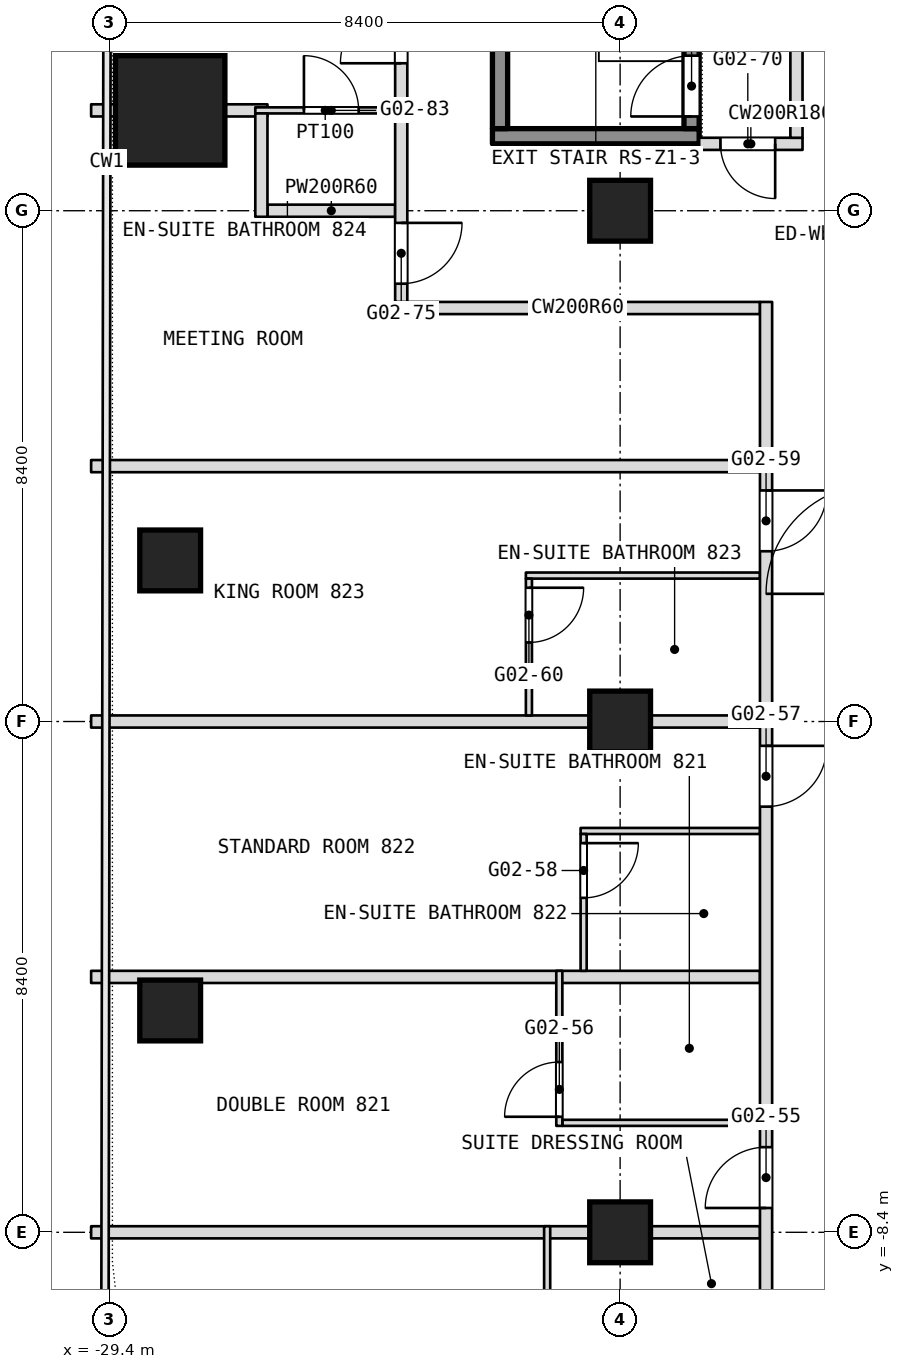
"""IFC4 building model, lengths in metres.
Left out: names, types, materials, properties, quantities, classifications, styles, units other than length and angle.
Written with IfcOpenShell. Run it as: python <this file> out.ifc"""

import sys

from ifc_helpers import new_model, si_unit, direction, frame, frame_2d, origin, origin_2d, place, context, subcontext, project, spatial, rectangle, extrude, element, fill, save


model = new_model("IFC4")
c1 = context("Model", 3, precision=1e-05, world=origin(), true_north=direction((0.0, 1.0)))
c2 = subcontext(c1, "Body", "Model", "MODEL_VIEW")
j1 = project(units=[si_unit("LENGTHUNIT", "METRE"), si_unit("PLANEANGLEUNIT", "RADIAN")], contexts=[c1])
p1 = place(None, origin())
s1 = spatial("IfcSite", under=j1, at=p1, CompositionType="ELEMENT")
p2 = place(p1, origin())
s2 = spatial("IfcBuilding", under=s1, at=p2, CompositionType="ELEMENT")
p3 = place(p2, frame((0.0, 0.0, 43.7)))
s3 = spatial("IfcBuildingStorey", under=s2, at=p3, CompositionType="ELEMENT", Elevation=43.7)
p4 = place(p3, frame((-28.4, 10.05, 0.0), z_axis=(0.0, 0.0, 1.0), x_axis=(1.0, 0.0, 0.0)))
e1 = element("IfcColumn", 1, at=p4, inside=s3, PredefinedType="COLUMN", context=c2, shape_type="SweptSolid", body=[
    extrude(rectangle(XDim=1.8, YDim=1.8, at=origin_2d()), origin(), (0.0, 0.0, 1.0), 3.6),
])
for number, where, z_axis, x_axis in (
    (2, (-21.0, -8.4, 0.0), (0.0, 0.0, 1.0), (1.0, 0.0, 0.0)),
    (3, (-21.0, 0.0, 0.0), (0.0, 0.0, 1.0), (1.0, 0.0, 0.0)),
    (4, (-21.0, 8.4, 0.0), (0.0, 0.0, 1.0), (1.0, 0.0, 0.0)),
    (5, (-28.4, -4.752, 0.0), (0.0, 0.0, 1.0), (1.0, 0.0, 0.0)),
    (6, (-28.4, 2.649, 0.0), (0.0, 0.0, 1.0), (1.0, 0.0, 0.0)),
):
    element("IfcColumn", number, at=place(p3, frame(where, z_axis=z_axis, x_axis=x_axis)), inside=s3, PredefinedType="COLUMN", context=c2, shape_type="SweptSolid", body=[
        extrude(rectangle(XDim=1.0, YDim=1.0, at=origin_2d()), origin(), (0.0, 0.0, 1.0), 3.6),
    ])
p5 = place(p3, frame((-29.7, -8.4, 0.0), z_axis=(0.0, 0.0, 1.0), x_axis=(1.0, 0.0, 0.0)))
e7 = element("IfcWall", 7, at=p5, inside=s3, PredefinedType="PARTITIONING", context=c2, shape_type="SweptSolid", body=[
    extrude(rectangle(XDim=11.0, YDim=0.2, at=frame_2d((5.5, 0.0))), origin(), (0.0, 0.0, 1.0), 2.84),
])
p6 = place(p3, frame((-21.95, -6.6, 0.0), z_axis=(0.0, 0.0, 1.0), x_axis=(1.0, 0.0, 0.0)))
e8 = element("IfcWall", 8, at=p6, inside=s3, PredefinedType="PARTITIONING", context=c2, shape_type="SweptSolid", body=[
    extrude(rectangle(XDim=3.25, YDim=0.1, at=frame_2d((1.625, 0.0))), origin(), (0.0, 0.0, 1.0), 3.34),
])
p7 = place(p3, frame((-29.7, -4.2, 0.0), z_axis=(0.0, 0.0, 1.0), x_axis=(1.0, 0.0, 0.0)))
e9 = element("IfcWall", 9, at=p7, inside=s3, PredefinedType="PARTITIONING", context=c2, shape_type="SweptSolid", body=[
    extrude(rectangle(XDim=11.0, YDim=0.2, at=frame_2d((5.5, 0.0))), origin(), (0.0, 0.0, 1.0), 3.34),
])
p8 = place(p3, frame((-21.65, -1.8, 0.0), z_axis=(0.0, 0.0, 1.0), x_axis=(1.0, 0.0, 0.0)))
e10 = element("IfcWall", 10, at=p8, inside=s3, PredefinedType="PARTITIONING", context=c2, shape_type="SweptSolid", body=[
    extrude(rectangle(XDim=2.95, YDim=0.1, at=frame_2d((1.475, 0.0))), origin(), (0.0, 0.0, 1.0), 3.34),
])
p9 = place(p3, frame((-29.7, 0.0, 0.0), z_axis=(0.0, 0.0, 1.0), x_axis=(1.0, 0.0, 0.0)))
e11 = element("IfcWall", 11, at=p9, inside=s3, PredefinedType="PARTITIONING", context=c2, shape_type="SweptSolid", body=[
    extrude(rectangle(XDim=11.0, YDim=0.2, at=frame_2d((5.5, 0.0))), origin(), (0.0, 0.0, 1.0), 2.84),
])
p10 = place(p3, frame((-22.55, 2.4, 0.0), z_axis=(0.0, 0.0, 1.0), x_axis=(1.0, 0.0, 0.0)))
e12 = element("IfcWall", 12, at=p10, inside=s3, PredefinedType="PARTITIONING", context=c2, shape_type="SweptSolid", body=[
    extrude(rectangle(XDim=3.85, YDim=0.1, at=frame_2d((1.925, 0.0))), origin(), (0.0, 0.0, 1.0), 3.34),
])
p11 = place(p3, frame((-29.7, 4.2, 0.0), z_axis=(0.0, 0.0, 1.0), x_axis=(1.0, 0.0, 0.0)))
e13 = element("IfcWall", 13, at=p11, inside=s3, PredefinedType="PARTITIONING", context=c2, shape_type="SweptSolid", body=[
    extrude(rectangle(XDim=11.0, YDim=0.2, at=frame_2d((5.5, 0.0))), origin(), (0.0, 0.0, 1.0), 3.34),
])
p12 = place(p3, frame((-24.7, 6.8, 0.0), z_axis=(0.0, 0.0, 1.0), x_axis=(1.0, 0.0, 0.0)))
e14 = element("IfcWall", 14, at=p12, inside=s3, PredefinedType="PARTITIONING", context=c2, shape_type="SweptSolid", body=[
    extrude(rectangle(XDim=6.0, YDim=0.2, at=frame_2d((3.0, 0.0))), origin(), (0.0, 0.0, 1.0), 3.34),
])
p13 = place(p3, frame((-26.8, 8.4, 0.0), z_axis=(0.0, 0.0, 1.0), x_axis=(1.0, 0.0, 0.0)))
e15 = element("IfcWall", 15, at=p13, inside=s3, PredefinedType="PARTITIONING", context=c2, shape_type="SweptSolid", body=[
    extrude(rectangle(XDim=2.1, YDim=0.2, at=frame_2d((1.05, 0.0))), origin(), (0.0, 0.0, 1.0), 2.84),
])
p14 = place(p3, frame((-19.7, 9.5, 0.0), z_axis=(0.0, 0.0, 1.0), x_axis=(1.0, 0.0, 0.0)))
e16 = element("IfcWall", 16, at=p14, inside=s3, PredefinedType="PARTITIONING", context=c2, shape_type="SweptSolid", body=[
    extrude(rectangle(XDim=1.7, YDim=0.2, at=frame_2d((0.85, 0.0))), origin(), (0.0, 0.0, 1.0), 3.34),
])
p15 = place(p14, frame((0.35, 0.0, 0.0)))
e17 = element("IfcOpeningElement", 17, at=p15, cuts=e16, PredefinedType="OPENING", context=c2, shape_type="SweptSolid", body=[
    extrude(rectangle(XDim=0.9, YDim=2.1, at=frame_2d((0.45, 1.05))), frame((0.0, 0.1, 0.0), z_axis=(0.0, -1.0, 0.0), x_axis=(1.0, 0.0, 0.0)), (0.0, 0.0, 1.0), 0.2),
])
p16 = place(p3, frame((-29.7, 10.05, 0.0), z_axis=(0.0, 0.0, 1.0), x_axis=(1.0, 0.0, 0.0)))
e18 = element("IfcWall", 18, at=p16, inside=s3, PredefinedType="PARTITIONING", context=c2, shape_type="SweptSolid", body=[
    extrude(rectangle(XDim=0.4, YDim=0.2, at=frame_2d((0.2, 0.0))), origin(), (0.0, 0.0, 1.0), 3.34),
])
p17 = place(p3, frame((-27.5, 10.05, 0.0), z_axis=(0.0, 0.0, 1.0), x_axis=(1.0, 0.0, 0.0)))
e19 = element("IfcWall", 19, at=p17, inside=s3, PredefinedType="PARTITIONING", context=c2, shape_type="SweptSolid", body=[
    extrude(rectangle(XDim=0.7, YDim=0.2, at=frame_2d((0.35, 0.0))), origin(), (0.0, 0.0, 1.0), 3.34),
])
p18 = place(p3, frame((-27.0, 10.05, 0.0), z_axis=(0.0, 0.0, 1.0), x_axis=(1.0, 0.0, 0.0)))
e20 = element("IfcWall", 20, at=p18, inside=s3, PredefinedType="PARTITIONING", context=c2, shape_type="SweptSolid", body=[
    extrude(rectangle(XDim=2.3, YDim=0.1, at=frame_2d((1.15, 0.0))), origin(), (0.0, 0.0, 1.0), 3.34),
])
p19 = place(p18, frame((0.8, 0.0, 0.0)))
e21 = element("IfcOpeningElement", 21, at=p19, cuts=e20, PredefinedType="OPENING", context=c2, shape_type="SweptSolid", body=[
    extrude(rectangle(XDim=0.9, YDim=2.1, at=frame_2d((0.45, 1.05))), frame((0.0, 0.05, 0.0), z_axis=(0.0, -1.0, 0.0), x_axis=(1.0, 0.0, 0.0)), (0.0, 0.0, 1.0), 0.1),
])
p20 = place(p3, frame((-18.1, 9.6, 0.0), z_axis=(0.0, 0.0, 1.0), x_axis=(0.0, 1.0, 0.0)))
e22 = element("IfcWall", 22, at=p20, inside=s3, PredefinedType="PARTITIONING", context=c2, shape_type="SweptSolid", body=[
    extrude(rectangle(XDim=6.2, YDim=0.2, at=frame_2d((3.1, 0.0))), origin(), (0.0, 0.0, 1.0), 3.34),
])
p21 = place(p3, frame((-18.6, -16.665, 0.0), z_axis=(0.0, 0.0, 1.0), x_axis=(0.0, 1.0, 0.0)))
e23 = element("IfcWall", 23, at=p21, inside=s3, PredefinedType="PARTITIONING", context=c2, shape_type="SweptSolid", body=[
    extrude(rectangle(XDim=23.565, YDim=0.2, at=frame_2d((11.782, 0.0))), origin(), (0.0, 0.0, 1.0), 3.34),
])
p22 = place(p21, frame((4.0, 0.0, 0.0)))
e24 = element("IfcOpeningElement", 24, at=p22, cuts=e23, PredefinedType="OPENING", context=c2, shape_type="SweptSolid", body=[
    extrude(rectangle(XDim=1.1, YDim=2.1, at=frame_2d((0.55, 1.05))), frame((0.0, 0.1, 0.0), z_axis=(0.0, -1.0, 0.0), x_axis=(1.0, 0.0, 0.0)), (0.0, 0.0, 1.0), 0.2),
])
p23 = place(p21, frame((8.665, 0.0, 0.0)))
e25 = element("IfcOpeningElement", 25, at=p23, cuts=e23, PredefinedType="OPENING", context=c2, shape_type="SweptSolid", body=[
    extrude(rectangle(XDim=1.0, YDim=2.1, at=frame_2d((0.5, 1.05))), frame((0.0, 0.1, 0.0), z_axis=(0.0, -1.0, 0.0), x_axis=(1.0, 0.0, 0.0)), (0.0, 0.0, 1.0), 0.2),
])
p24 = place(p21, frame((15.265, 0.0, 0.0)))
e26 = element("IfcOpeningElement", 26, at=p24, cuts=e23, PredefinedType="OPENING", context=c2, shape_type="SweptSolid", body=[
    extrude(rectangle(XDim=1.0, YDim=2.1, at=frame_2d((0.5, 1.05))), frame((0.0, 0.1, 0.0), z_axis=(0.0, -1.0, 0.0), x_axis=(1.0, 0.0, 0.0)), (0.0, 0.0, 1.0), 0.2),
])
p25 = place(p21, frame((19.465, 0.0, 0.0)))
e27 = element("IfcOpeningElement", 27, at=p25, cuts=e23, PredefinedType="OPENING", context=c2, shape_type="SweptSolid", body=[
    extrude(rectangle(XDim=1.0, YDim=2.1, at=frame_2d((0.5, 1.05))), frame((0.0, 0.1, 0.0), z_axis=(0.0, -1.0, 0.0), x_axis=(1.0, 0.0, 0.0)), (0.0, 0.0, 1.0), 0.2),
])
p26 = place(p3, frame((-21.6, -4.1, 0.0), z_axis=(0.0, 0.0, 1.0), x_axis=(0.0, 1.0, 0.0)))
e28 = element("IfcWall", 28, at=p26, inside=s3, PredefinedType="PARTITIONING", context=c2, shape_type="SweptSolid", body=[
    extrude(rectangle(XDim=2.25, YDim=0.1, at=frame_2d((1.125, 0.0))), origin(), (0.0, 0.0, 1.0), 3.34),
])
p27 = place(p26, frame((1.2, 0.0, 0.0)))
e29 = element("IfcOpeningElement", 29, at=p27, cuts=e28, PredefinedType="OPENING", context=c2, shape_type="SweptSolid", body=[
    extrude(rectangle(XDim=0.9, YDim=2.1, at=frame_2d((0.45, 1.05))), frame((0.0, 0.05, 0.0), z_axis=(0.0, -1.0, 0.0), x_axis=(1.0, 0.0, 0.0)), (0.0, 0.0, 1.0), 0.1),
])
p28 = place(p3, frame((-22.0, -6.65, 0.0), z_axis=(0.0, 0.0, 1.0), x_axis=(0.0, 1.0, 0.0)))
e30 = element("IfcWall", 30, at=p28, inside=s3, PredefinedType="PARTITIONING", context=c2, shape_type="SweptSolid", body=[
    extrude(rectangle(XDim=2.55, YDim=0.1, at=frame_2d((1.275, 0.0))), origin(), (0.0, 0.0, 1.0), 3.34),
])
p29 = place(p28, frame((0.15, 0.0, 0.0)))
e31 = element("IfcOpeningElement", 31, at=p29, cuts=e30, PredefinedType="OPENING", context=c2, shape_type="SweptSolid", body=[
    extrude(rectangle(XDim=0.9, YDim=2.1, at=frame_2d((0.45, 1.05))), frame((0.0, 0.05, 0.0), z_axis=(0.0, -1.0, 0.0), x_axis=(1.0, 0.0, 0.0)), (0.0, 0.0, 1.0), 0.1),
])
p30 = place(p3, frame((-22.2, -10.85, 0.0), z_axis=(0.0, 0.0, 1.0), x_axis=(0.0, 1.0, 0.0)))
e32 = element("IfcWall", 32, at=p30, inside=s3, PredefinedType="PARTITIONING", context=c2, shape_type="SweptSolid", body=[
    extrude(rectangle(XDim=2.55, YDim=0.1, at=frame_2d((1.275, 0.0))), origin(), (0.0, 0.0, 1.0), 3.34),
])
p31 = place(p3, frame((-22.5, 0.1, 0.0), z_axis=(0.0, 0.0, 1.0), x_axis=(0.0, 1.0, 0.0)))
e33 = element("IfcWall", 33, at=p31, inside=s3, PredefinedType="PARTITIONING", context=c2, shape_type="SweptSolid", body=[
    extrude(rectangle(XDim=2.25, YDim=0.1, at=frame_2d((1.125, 0.0))), origin(), (0.0, 0.0, 1.0), 3.34),
])
p32 = place(p31, frame((1.2, 0.0, 0.0)))
e34 = element("IfcOpeningElement", 34, at=p32, cuts=e33, PredefinedType="OPENING", context=c2, shape_type="SweptSolid", body=[
    extrude(rectangle(XDim=0.9, YDim=2.1, at=frame_2d((0.45, 1.05))), frame((0.0, 0.05, 0.0), z_axis=(0.0, -1.0, 0.0), x_axis=(1.0, 0.0, 0.0)), (0.0, 0.0, 1.0), 0.1),
])
p33 = place(p3, frame((-24.6, 6.9, 0.0), z_axis=(0.0, 0.0, 1.0), x_axis=(0.0, 1.0, 0.0)))
e35 = element("IfcWall", 35, at=p33, inside=s3, PredefinedType="PARTITIONING", context=c2, shape_type="SweptSolid", body=[
    extrude(rectangle(XDim=11.6, YDim=0.2, at=frame_2d((5.8, 0.0))), origin(), (0.0, 0.0, 1.0), 3.34),
])
p34 = place(p33, frame((8.5, 0.0, 0.0)))
e36 = element("IfcOpeningElement", 36, at=p34, cuts=e35, PredefinedType="OPENING", context=c2, shape_type="SweptSolid", body=[
    extrude(rectangle(XDim=1.0, YDim=2.1, at=frame_2d((0.5, 1.05))), frame((0.0, 0.1, 0.0), z_axis=(0.0, -1.0, 0.0), x_axis=(1.0, 0.0, 0.0)), (0.0, 0.0, 1.0), 0.2),
])
p35 = place(p33, frame((10.2, 0.0, 0.0)))
e37 = element("IfcOpeningElement", 37, at=p35, cuts=e35, PredefinedType="OPENING", context=c2, shape_type="SweptSolid", body=[
    extrude(rectangle(XDim=1.0, YDim=2.1, at=frame_2d((0.5, 1.05))), frame((0.0, 0.1, 0.0), z_axis=(0.0, -1.0, 0.0), x_axis=(1.0, 0.0, 0.0)), (0.0, 0.0, 1.0), 0.2),
])
p36 = place(p33, frame((0.3, 0.0, 0.0)))
e38 = element("IfcOpeningElement", 38, at=p36, cuts=e35, PredefinedType="OPENING", context=c2, shape_type="SweptSolid", body=[
    extrude(rectangle(XDim=1.0, YDim=2.1, at=frame_2d((0.5, 1.05))), frame((0.0, 0.1, 0.0), z_axis=(0.0, -1.0, 0.0), x_axis=(1.0, 0.0, 0.0)), (0.0, 0.0, 1.0), 0.2),
])
p37 = place(p33, frame((3.925, 0.0, 0.0)))
e39 = element("IfcOpeningElement", 39, at=p37, cuts=e35, PredefinedType="OPENING", context=c2, shape_type="SweptSolid", body=[
    extrude(rectangle(XDim=1.0, YDim=2.1, at=frame_2d((0.5, 1.05))), frame((0.0, 0.1, 0.0), z_axis=(0.0, -1.0, 0.0), x_axis=(1.0, 0.0, 0.0)), (0.0, 0.0, 1.0), 0.2),
])
p38 = place(p3, frame((-26.9, 8.3, 0.0), z_axis=(0.0, 0.0, 1.0), x_axis=(0.0, 1.0, 0.0)))
e40 = element("IfcWall", 40, at=p38, inside=s3, PredefinedType="PARTITIONING", context=c2, shape_type="SweptSolid", body=[
    extrude(rectangle(XDim=1.7, YDim=0.2, at=frame_2d((0.85, 0.0))), origin(), (0.0, 0.0, 1.0), 3.34),
])
p39 = place(p3, frame((-23.1, 9.625, 0.1), z_axis=(0.0, 0.0, 1.0), x_axis=(1.0, 0.0, 0.0)))
e41 = element("IfcWall", 41, at=p39, inside=s3, PredefinedType="SHEAR", context=c2, shape_type="SweptSolid", body=[
    extrude(rectangle(XDim=3.4, YDim=0.25, at=frame_2d((1.7, 0.0))), origin(), (0.0, 0.0, 1.0), 3.6),
])
p40 = place(p3, frame((-22.975, 9.75, 0.1), z_axis=(0.0, 0.0, 1.0), x_axis=(0.0, 1.0, 0.0)))
e42 = element("IfcWall", 42, at=p40, inside=s3, PredefinedType="SHEAR", context=c2, shape_type="SweptSolid", body=[
    extrude(rectangle(XDim=5.7, YDim=0.25, at=frame_2d((2.85, 0.0))), origin(), (0.0, 0.0, 1.0), 3.6),
])
p41 = place(p3, frame((-19.825, 9.75, 0.1), z_axis=(0.0, 0.0, 1.0), x_axis=(0.0, 1.0, 0.0)))
e43 = element("IfcWall", 43, at=p41, inside=s3, PredefinedType="SHEAR", context=c2, shape_type="SweptSolid", body=[
    extrude(rectangle(XDim=5.7, YDim=0.25, at=frame_2d((2.85, 0.0))), origin(), (0.0, 0.0, 1.0), 3.6),
])
p42 = place(p41, frame((0.2, 0.0, 0.0)))
e44 = element("IfcOpeningElement", 44, at=p42, cuts=e43, PredefinedType="OPENING", context=c2, shape_type="SweptSolid", body=[
    extrude(rectangle(XDim=1.0, YDim=2.1, at=frame_2d((0.5, 1.05))), frame((0.0, 0.125, 0.0), z_axis=(0.0, -1.0, 0.0), x_axis=(1.0, 0.0, 0.0)), (0.0, 0.0, 1.0), 0.25),
])
p43 = place(p15, origin())
e45 = element("IfcDoor", 45, at=p43, inside=s3, OperationType="SINGLE_SWING_RIGHT", PredefinedType="DOOR", context=c2, shape_type="SweptSolid", body=[
    extrude(rectangle(XDim=0.9, YDim=2.1, at=frame_2d((0.45, 1.05))), frame((0.0, 0.025, 0.0), z_axis=(0.0, -1.0, 0.0), x_axis=(1.0, 0.0, 0.0)), (0.0, 0.0, 1.0), 0.05),
])
fill(e17, e45)
p44 = place(p19, origin())
e46 = element("IfcDoor", 46, at=p44, inside=s3, OperationType="SINGLE_SWING_LEFT", PredefinedType="DOOR", context=c2, shape_type="SweptSolid", body=[
    extrude(rectangle(XDim=0.9, YDim=2.1, at=frame_2d((0.45, 1.05))), frame((0.0, 0.025, 0.0), z_axis=(0.0, -1.0, 0.0), x_axis=(1.0, 0.0, 0.0)), (0.0, 0.0, 1.0), 0.05),
])
fill(e21, e46)
p45 = place(p23, origin())
e47 = element("IfcDoor", 47, at=p45, inside=s3, OperationType="SINGLE_SWING_RIGHT", PredefinedType="DOOR", context=c2, shape_type="SweptSolid", body=[
    extrude(rectangle(XDim=1.0, YDim=2.1, at=frame_2d((0.5, 1.05))), frame((0.0, 0.025, 0.0), z_axis=(0.0, -1.0, 0.0), x_axis=(1.0, 0.0, 0.0)), (0.0, 0.0, 1.0), 0.05),
])
fill(e25, e47)
p46 = place(p24, origin())
e48 = element("IfcDoor", 48, at=p46, inside=s3, OperationType="SINGLE_SWING_RIGHT", PredefinedType="DOOR", context=c2, shape_type="SweptSolid", body=[
    extrude(rectangle(XDim=1.0, YDim=2.1, at=frame_2d((0.5, 1.05))), frame((0.0, 0.025, 0.0), z_axis=(0.0, -1.0, 0.0), x_axis=(1.0, 0.0, 0.0)), (0.0, 0.0, 1.0), 0.05),
])
fill(e26, e48)
p47 = place(p25, origin())
e49 = element("IfcDoor", 49, at=p47, inside=s3, OperationType="SINGLE_SWING_RIGHT", PredefinedType="DOOR", context=c2, shape_type="SweptSolid", body=[
    extrude(rectangle(XDim=1.0, YDim=2.1, at=frame_2d((0.5, 1.05))), frame((0.0, 0.025, 0.0), z_axis=(0.0, -1.0, 0.0), x_axis=(1.0, 0.0, 0.0)), (0.0, 0.0, 1.0), 0.05),
])
fill(e27, e49)
p48 = place(p27, origin())
e50 = element("IfcDoor", 50, at=p48, inside=s3, OperationType="SINGLE_SWING_LEFT", PredefinedType="DOOR", context=c2, shape_type="SweptSolid", body=[
    extrude(rectangle(XDim=0.9, YDim=2.1, at=frame_2d((0.45, 1.05))), frame((0.0, 0.025, 0.0), z_axis=(0.0, -1.0, 0.0), x_axis=(1.0, 0.0, 0.0)), (0.0, 0.0, 1.0), 0.05),
])
fill(e29, e50)
p49 = place(p29, origin())
e51 = element("IfcDoor", 51, at=p49, inside=s3, OperationType="SINGLE_SWING_RIGHT", PredefinedType="DOOR", context=c2, shape_type="SweptSolid", body=[
    extrude(rectangle(XDim=0.9, YDim=2.1, at=frame_2d((0.45, 1.05))), frame((0.0, 0.025, 0.0), z_axis=(0.0, -1.0, 0.0), x_axis=(1.0, 0.0, 0.0)), (0.0, 0.0, 1.0), 0.05),
])
fill(e31, e51)
p50 = place(p32, origin())
e52 = element("IfcDoor", 52, at=p50, inside=s3, OperationType="SINGLE_SWING_LEFT", PredefinedType="DOOR", context=c2, shape_type="SweptSolid", body=[
    extrude(rectangle(XDim=0.9, YDim=2.1, at=frame_2d((0.45, 1.05))), frame((0.0, 0.025, 0.0), z_axis=(0.0, -1.0, 0.0), x_axis=(1.0, 0.0, 0.0)), (0.0, 0.0, 1.0), 0.05),
])
fill(e34, e52)
p51 = place(p36, origin())
e53 = element("IfcDoor", 53, at=p51, inside=s3, OperationType="SINGLE_SWING_LEFT", PredefinedType="DOOR", context=c2, shape_type="SweptSolid", body=[
    extrude(rectangle(XDim=1.0, YDim=2.1, at=frame_2d((0.5, 1.05))), frame((0.0, 0.025, 0.0), z_axis=(0.0, -1.0, 0.0), x_axis=(1.0, 0.0, 0.0)), (0.0, 0.0, 1.0), 0.05),
])
fill(e38, e53)
p52 = place(p37, origin())
e54 = element("IfcDoor", 54, at=p52, inside=s3, OperationType="SINGLE_SWING_LEFT", PredefinedType="DOOR", context=c2, shape_type="SweptSolid", body=[
    extrude(rectangle(XDim=1.0, YDim=2.1, at=frame_2d((0.5, 1.05))), frame((0.0, 0.025, 0.0), z_axis=(0.0, -1.0, 0.0), x_axis=(1.0, 0.0, 0.0)), (0.0, 0.0, 1.0), 0.05),
])
fill(e39, e54)
p53 = place(p42, origin())
e55 = element("IfcDoor", 55, at=p53, inside=s3, OperationType="SINGLE_SWING_LEFT", PredefinedType="DOOR", context=c2, shape_type="SweptSolid", body=[
    extrude(rectangle(XDim=1.0, YDim=2.1, at=frame_2d((0.5, 1.05))), frame((0.0, 0.025, 0.0), z_axis=(0.0, -1.0, 0.0), x_axis=(1.0, 0.0, 0.0)), (0.0, 0.0, 1.0), 0.05),
])
fill(e44, e55)
save(model, sys.argv[1])
